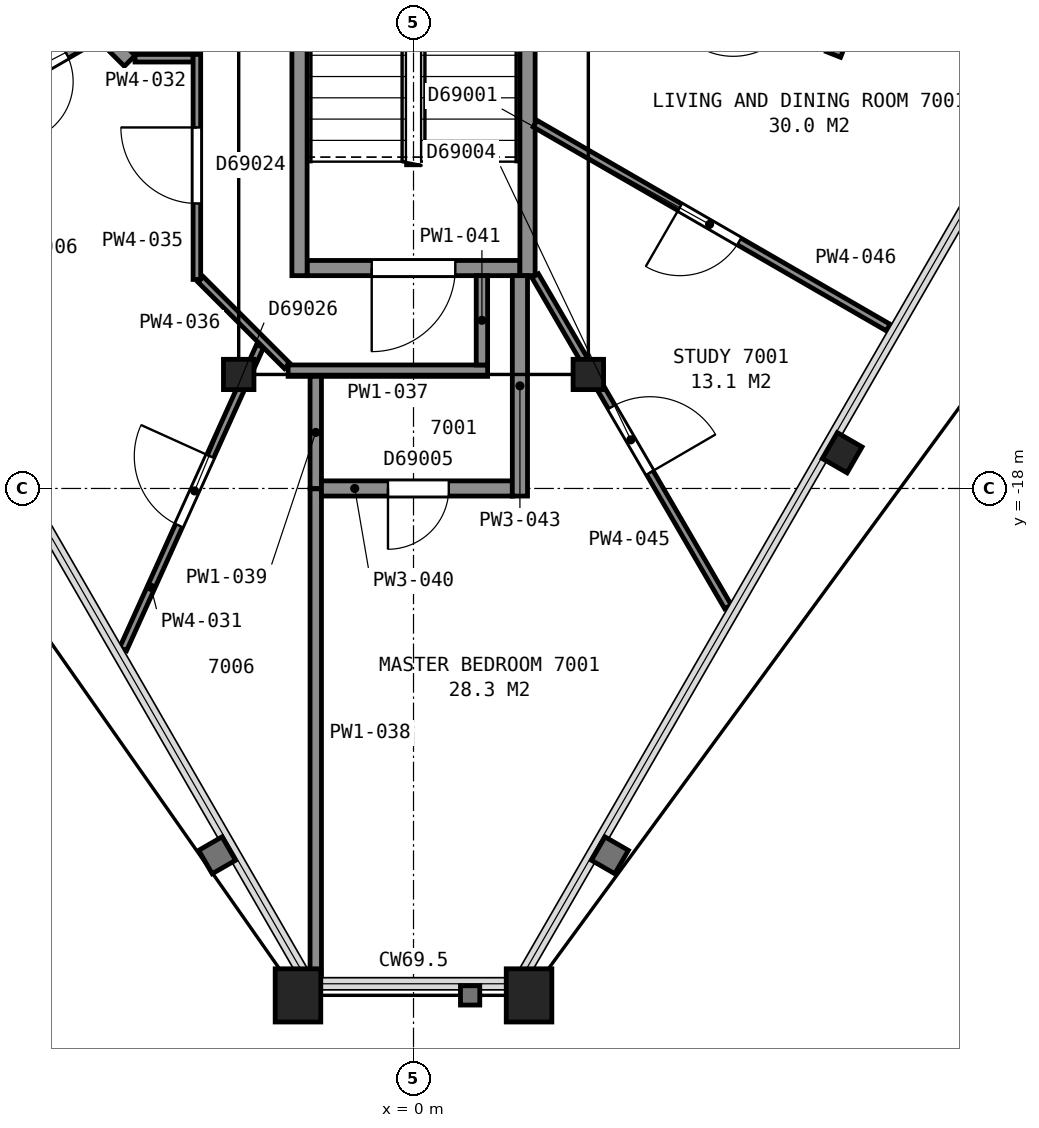
"""IFC4 building model, lengths in metres.
Left out: names, types, materials, properties, quantities, classifications, styles, units other than length and angle.
Written with IfcOpenShell. Run it as: python <this file> out.ifc"""

import sys

from ifc_helpers import new_model, si_unit, direction, frame, frame_2d, origin, origin_2d, place, context, subcontext, project, spatial, rectangle, hollow_rectangle, i_section, extrude, element, fill, save


model = new_model("IFC4")
c1 = context("Model", 3, precision=1e-05, world=origin(), true_north=direction((0.0, 1.0)))
c2 = subcontext(c1, "Body", "Model", "MODEL_VIEW")
j1 = project(units=[si_unit("LENGTHUNIT", "METRE"), si_unit("PLANEANGLEUNIT", "RADIAN")], contexts=[c1])
p1 = place(None, origin())
s1 = spatial("IfcSite", under=j1, at=p1, CompositionType="ELEMENT")
p2 = place(p1, origin())
s2 = spatial("IfcBuilding", under=s1, at=p2, CompositionType="ELEMENT")
p3 = place(p2, frame((0.0, 0.0, 278.8)))
s3 = spatial("IfcBuildingStorey", under=s2, at=p3, CompositionType="ELEMENT", Elevation=278.8)
for number, where, z_axis, x_axis in (
    (1, (-1.52, -24.67, 0.0), (0.0, 0.0, 1.0), (-1.0, 0.0, 0.0)),
    (2, (1.52, -24.67, 0.0), (0.0, 0.0, 1.0), (-1.0, 0.0, 0.0)),
):
    element("IfcColumn", number, at=place(p3, frame(where, z_axis=z_axis, x_axis=x_axis)), inside=s3, PredefinedType="COLUMN", context=c2, shape_type="SweptSolid", body=[
        extrude(hollow_rectangle(XDim=0.6, YDim=0.7, WallThickness=0.04, at=origin_2d()), origin(), (0.0, 0.0, 1.0), 3.7),
    ])
p4 = place(p3, frame((5.64, -17.53, 0.0), z_axis=(0.0, 0.0, 1.0), x_axis=(-0.5, -0.866025403784, 0.0)))
e3 = element("IfcColumn", 3, at=p4, inside=s3, PredefinedType="COLUMN", context=c2, shape_type="SweptSolid", body=[
    extrude(i_section(OverallWidth=0.394, OverallDepth=0.376, WebThickness=0.017, FlangeThickness=0.028, FilletRadius=0.015, at=origin_2d()), origin(), (0.0, 0.0, 1.0), 3.7),
])
for number, where, z_axis, x_axis in (
    (4, (-2.3, -16.5, 0.0), (0.0, 0.0, 1.0), (-1.0, 0.0, 0.0)),
    (5, (2.3, -16.5, 0.0), (0.0, 0.0, 1.0), (-1.0, 0.0, 0.0)),
):
    element("IfcColumn", number, at=place(p3, frame(where, z_axis=z_axis, x_axis=x_axis)), inside=s3, PredefinedType="COLUMN", context=c2, shape_type="SweptSolid", body=[
        extrude(i_section(OverallWidth=0.401, OverallDepth=0.399, WebThickness=0.025, FlangeThickness=0.04, FilletRadius=0.015, at=origin_2d()), origin(), (0.0, 0.0, 1.0), 3.7),
    ])
p5 = place(p3, frame((-1.4, -15.1, 0.0), z_axis=(0.0, 0.0, 1.0), x_axis=(1.0, 0.0, 0.0)))
e6 = element("IfcWall", 6, at=p5, inside=s3, PredefinedType="PARTITIONING", context=c2, shape_type="SweptSolid", body=[
    extrude(rectangle(XDim=2.8, YDim=0.2, at=frame_2d((1.4, 0.0))), origin(), (0.0, 0.0, 1.0), 3.45),
])
p6 = place(p5, frame((0.85, 0.0, 0.0)))
e7 = element("IfcOpeningElement", 7, at=p6, cuts=e6, PredefinedType="OPENING", context=c2, shape_type="SweptSolid", body=[
    extrude(rectangle(XDim=1.1, YDim=2.1, at=frame_2d((0.55, 1.05))), frame((0.0, 0.11, 0.0), z_axis=(0.0, -1.0, 0.0), x_axis=(1.0, 0.0, 0.0)), (0.0, 0.0, 1.0), 0.22),
])
for number, where, z_axis, x_axis in (
    (8, (1.5, -8.0, 0.0), (0.0, 0.0, 1.0), (0.0, -1.0, 0.0)),
    (9, (-1.5, -8.0, 0.0), (0.0, 0.0, 1.0), (0.0, -1.0, 0.0)),
):
    element("IfcWall", number, at=place(p3, frame(where, z_axis=z_axis, x_axis=x_axis)), inside=s3, PredefinedType="PARTITIONING", context=c2, shape_type="SweptSolid", body=[
        extrude(rectangle(XDim=7.2, YDim=0.2, at=frame_2d((3.6, 0.0))), origin(), (0.0, 0.0, 1.0), 3.45),
    ])
p7 = place(p3, frame((-5.607, -12.838, 0.0), z_axis=(0.0, 0.0, 1.0), x_axis=(0.866095534226, 0.499878510834, 0.0)))
e10 = element("IfcWall", 10, at=p7, inside=s3, PredefinedType="PARTITIONING", context=c2, shape_type="SweptSolid", body=[
    extrude(rectangle(XDim=1.58, YDim=0.2, at=frame_2d((0.79, 0.0))), origin(), (0.0, 0.0, 1.0), 2.723),
])
p8 = place(p7, frame((0.38, 0.0, 0.0)))
e11 = element("IfcOpeningElement", 11, at=p8, cuts=e10, PredefinedType="OPENING", context=c2, shape_type="SweptSolid", body=[
    extrude(rectangle(XDim=0.8, YDim=2.1, at=frame_2d((0.4, 1.05))), frame((0.0, 0.11, 0.0), z_axis=(0.0, -1.0, 0.0), x_axis=(1.0, 0.0, 0.0)), (0.0, 0.0, 1.0), 0.22),
])
p9 = place(p3, frame((-5.09, -11.018, 0.0), z_axis=(0.0, 0.0, 1.0), x_axis=(0.707106781187, -0.707106781187, 0.0)))
e12 = element("IfcWall", 12, at=p9, inside=s3, PredefinedType="PARTITIONING", context=c2, shape_type="SweptSolid", body=[
    extrude(rectangle(XDim=1.918, YDim=0.2, at=frame_2d((0.959, 0.0))), origin(), (0.0, 0.0, 1.0), 2.723),
])
p10 = place(p3, frame((-2.019, -16.127, 0.0), z_axis=(0.0, 0.0, 1.0), x_axis=(-0.411876718461, -0.911239578151, 0.0)))
e13 = element("IfcWall", 13, at=p10, inside=s3, PredefinedType="PARTITIONING", context=c2, shape_type="SweptSolid", body=[
    extrude(rectangle(XDim=4.376, YDim=0.1, at=frame_2d((2.188, 0.0))), origin(), (0.0, 0.0, 1.0), 2.723),
])
p11 = place(p10, frame((1.591, 0.0, 0.0)))
e14 = element("IfcOpeningElement", 14, at=p11, cuts=e13, PredefinedType="OPENING", context=c2, shape_type="SweptSolid", body=[
    extrude(rectangle(XDim=1.0, YDim=2.1, at=frame_2d((0.5, 1.05))), frame((0.0, 0.06, 0.0), z_axis=(0.0, -1.0, 0.0), x_axis=(1.0, 0.0, 0.0)), (0.0, 0.0, 1.0), 0.12),
])
p12 = place(p3, frame((-3.664, -12.339, 0.0), z_axis=(0.0, 0.0, 1.0), x_axis=(1.0, 0.0, 0.0)))
e15 = element("IfcWall", 15, at=p12, inside=s3, PredefinedType="PARTITIONING", context=c2, shape_type="SweptSolid", body=[
    extrude(rectangle(XDim=0.764, YDim=0.1, at=frame_2d((0.382, 0.0))), origin(), (0.0, 0.0, 1.0), 2.723),
])
p13 = place(p3, frame((-2.85, -15.25, 0.0), z_axis=(0.0, 0.0, 1.0), x_axis=(0.0, 1.0, 0.0)))
e16 = element("IfcWall", 16, at=p13, inside=s3, PredefinedType="PARTITIONING", context=c2, shape_type="SweptSolid", body=[
    extrude(rectangle(XDim=2.961, YDim=0.1, at=frame_2d((1.48, 0.0))), origin(), (0.0, 0.0, 1.0), 2.723),
])
p14 = place(p13, frame((1.0, 0.0, 0.0)))
e17 = element("IfcOpeningElement", 17, at=p14, cuts=e16, PredefinedType="OPENING", context=c2, shape_type="SweptSolid", body=[
    extrude(rectangle(XDim=1.0, YDim=2.1, at=frame_2d((0.5, 1.05))), frame((0.0, 0.06, 0.0), z_axis=(0.0, -1.0, 0.0), x_axis=(1.0, 0.0, 0.0)), (0.0, 0.0, 1.0), 0.12),
])
p15 = place(p3, frame((-2.801, -15.25, 0.0), z_axis=(0.0, 0.0, 1.0), x_axis=(0.707106781187, -0.707106781187, 0.0)))
e18 = element("IfcWall", 18, at=p15, inside=s3, PredefinedType="PARTITIONING", context=c2, shape_type="SweptSolid", body=[
    extrude(rectangle(XDim=1.608, YDim=0.1, at=frame_2d((0.804, 0.0))), origin(), (0.0, 0.0, 1.0), 2.723),
])
p16 = place(p3, frame((-1.65, -16.45, 0.0), z_axis=(0.0, 0.0, 1.0), x_axis=(1.0, 0.0, 0.0)))
e19 = element("IfcWall", 19, at=p16, inside=s3, PredefinedType="PARTITIONING", context=c2, shape_type="SweptSolid", body=[
    extrude(rectangle(XDim=2.625, YDim=0.15, at=frame_2d((1.312, 0.0))), origin(), (0.0, 0.0, 1.0), 2.723),
])
p17 = place(p3, frame((-1.286, -24.421, 0.0), z_axis=(0.0, 0.0, 1.0), x_axis=(0.0, 1.0, 0.0)))
e20 = element("IfcWall", 20, at=p17, inside=s3, PredefinedType="PARTITIONING", context=c2, shape_type="SweptSolid", body=[
    extrude(rectangle(XDim=6.416, YDim=0.15, at=frame_2d((3.208, 0.0))), origin(), (0.0, 0.0, 1.0), 2.723),
])
p18 = place(p3, frame((-1.286, -18.0, 0.0), z_axis=(0.0, 0.0, 1.0), x_axis=(0.0, 1.0, 0.0)))
e21 = element("IfcWall", 21, at=p18, inside=s3, PredefinedType="PARTITIONING", context=c2, shape_type="SweptSolid", body=[
    extrude(rectangle(XDim=1.475, YDim=0.15, at=frame_2d((0.738, 0.0))), origin(), (0.0, 0.0, 1.0), 2.723),
])
p19 = place(p3, frame((-1.211, -18.0, 0.0), z_axis=(0.0, 0.0, 1.0), x_axis=(1.0, 0.0, 0.0)))
e22 = element("IfcWall", 22, at=p19, inside=s3, PredefinedType="PARTITIONING", context=c2, shape_type="SweptSolid", body=[
    extrude(rectangle(XDim=2.511, YDim=0.2, at=frame_2d((1.255, 0.0))), origin(), (0.0, 0.0, 1.0), 2.723),
])
p20 = place(p19, frame((0.875, 0.0, 0.0)))
e23 = element("IfcOpeningElement", 23, at=p20, cuts=e22, PredefinedType="OPENING", context=c2, shape_type="SweptSolid", body=[
    extrude(rectangle(XDim=0.8, YDim=2.1, at=frame_2d((0.4, 1.05))), frame((0.0, 0.11, 0.0), z_axis=(0.0, -1.0, 0.0), x_axis=(1.0, 0.0, 0.0)), (0.0, 0.0, 1.0), 0.22),
])
p21 = place(p3, frame((0.9, -16.375, 0.0), z_axis=(0.0, 0.0, 1.0), x_axis=(0.0, 1.0, 0.0)))
e24 = element("IfcWall", 24, at=p21, inside=s3, PredefinedType="PARTITIONING", context=c2, shape_type="SweptSolid", body=[
    extrude(rectangle(XDim=1.175, YDim=0.15, at=frame_2d((0.587, 0.0))), origin(), (0.0, 0.0, 1.0), 2.723),
])
p22 = place(p3, frame((1.4, -18.1, 0.0), z_axis=(0.0, 0.0, 1.0), x_axis=(0.0, 1.0, 0.0)))
e25 = element("IfcWall", 25, at=p22, inside=s3, PredefinedType="PARTITIONING", context=c2, shape_type="SweptSolid", body=[
    extrude(rectangle(XDim=2.9, YDim=0.2, at=frame_2d((1.45, 0.0))), origin(), (0.0, 0.0, 1.0), 2.723),
])
p23 = place(p3, frame((4.137, -19.557, 0.0), z_axis=(0.0, 0.0, 1.0), x_axis=(-0.503229634544, 0.864152726615, 0.0)))
e26 = element("IfcWall", 26, at=p23, inside=s3, PredefinedType="PARTITIONING", context=c2, shape_type="SweptSolid", body=[
    extrude(rectangle(XDim=5.042, YDim=0.1, at=frame_2d((2.521, 0.0))), origin(), (0.0, 0.0, 1.0), 2.723),
])
p24 = place(p23, frame((2.042, 0.0, 0.0)))
e27 = element("IfcOpeningElement", 27, at=p24, cuts=e26, PredefinedType="OPENING", context=c2, shape_type="SweptSolid", body=[
    extrude(rectangle(XDim=1.0, YDim=2.1, at=frame_2d((0.5, 1.05))), frame((0.0, 0.06, 0.0), z_axis=(0.0, -1.0, 0.0), x_axis=(1.0, 0.0, 0.0)), (0.0, 0.0, 1.0), 0.12),
])
p25 = place(p3, frame((6.247, -15.883, 0.0), z_axis=(0.0, 0.0, 1.0), x_axis=(-0.866008267802, 0.500029679218, 0.0)))
e28 = element("IfcWall", 28, at=p25, inside=s3, PredefinedType="PARTITIONING", context=c2, shape_type="SweptSolid", body=[
    extrude(rectangle(XDim=5.365, YDim=0.1, at=frame_2d((2.683, 0.0))), origin(), (0.0, 0.0, 1.0), 2.723),
])
p26 = place(p25, frame((2.265, 0.0, 0.0)))
e29 = element("IfcOpeningElement", 29, at=p26, cuts=e28, PredefinedType="OPENING", context=c2, shape_type="SweptSolid", body=[
    extrude(rectangle(XDim=0.9, YDim=2.1, at=frame_2d((0.45, 1.05))), frame((0.0, 0.06, 0.0), z_axis=(0.0, -1.0, 0.0), x_axis=(1.0, 0.0, 0.0)), (0.0, 0.0, 1.0), 0.12),
])
p27 = place(p3, frame((5.526, -12.29, 0.0), z_axis=(0.0, 0.0, 1.0), x_axis=(0.364786545928, 0.931091174864, 0.0)))
e30 = element("IfcWall", 30, at=p27, inside=s3, PredefinedType="PARTITIONING", context=c2, shape_type="SweptSolid", body=[
    extrude(rectangle(XDim=3.019, YDim=0.2, at=frame_2d((1.51, 0.0))), origin(), (0.0, 0.0, 1.0), 2.723),
])
p28 = place(p6, origin())
e31 = element("IfcDoor", 31, at=p28, inside=s3, OperationType="SINGLE_SWING_LEFT", PredefinedType="DOOR", context=c2, shape_type="SweptSolid", body=[
    extrude(rectangle(XDim=1.1, YDim=2.1, at=frame_2d((0.55, 1.05))), frame((0.0, 0.025, 0.0), z_axis=(0.0, -1.0, 0.0), x_axis=(1.0, 0.0, 0.0)), (0.0, 0.0, 1.0), 0.05),
])
fill(e7, e31)
p29 = place(p8, origin())
e32 = element("IfcDoor", 32, at=p29, inside=s3, OperationType="SINGLE_SWING_LEFT", PredefinedType="DOOR", context=c2, shape_type="SweptSolid", body=[
    extrude(rectangle(XDim=0.8, YDim=2.1, at=frame_2d((0.4, 1.05))), frame((0.0, 0.025, 0.0), z_axis=(0.0, -1.0, 0.0), x_axis=(1.0, 0.0, 0.0)), (0.0, 0.0, 1.0), 0.05),
])
fill(e11, e32)
p30 = place(p11, origin())
e33 = element("IfcDoor", 33, at=p30, inside=s3, OperationType="SINGLE_SWING_LEFT", PredefinedType="DOOR", context=c2, shape_type="SweptSolid", body=[
    extrude(rectangle(XDim=1.0, YDim=2.1, at=frame_2d((0.5, 1.05))), frame((0.0, 0.025, 0.0), z_axis=(0.0, -1.0, 0.0), x_axis=(1.0, 0.0, 0.0)), (0.0, 0.0, 1.0), 0.05),
])
fill(e14, e33)
p31 = place(p14, origin())
e34 = element("IfcDoor", 34, at=p31, inside=s3, OperationType="SINGLE_SWING_RIGHT", PredefinedType="DOOR", context=c2, shape_type="SweptSolid", body=[
    extrude(rectangle(XDim=1.0, YDim=2.1, at=frame_2d((0.5, 1.05))), frame((0.0, 0.025, 0.0), z_axis=(0.0, -1.0, 0.0), x_axis=(1.0, 0.0, 0.0)), (0.0, 0.0, 1.0), 0.05),
])
fill(e17, e34)
p32 = place(p20, origin())
e35 = element("IfcDoor", 35, at=p32, inside=s3, OperationType="SINGLE_SWING_LEFT", PredefinedType="DOOR", context=c2, shape_type="SweptSolid", body=[
    extrude(rectangle(XDim=0.8, YDim=2.1, at=frame_2d((0.4, 1.05))), frame((0.0, 0.025, 0.0), z_axis=(0.0, -1.0, 0.0), x_axis=(1.0, 0.0, 0.0)), (0.0, 0.0, 1.0), 0.05),
])
fill(e23, e35)
p33 = place(p24, origin())
e36 = element("IfcDoor", 36, at=p33, inside=s3, OperationType="SINGLE_SWING_LEFT", PredefinedType="DOOR", context=c2, shape_type="SweptSolid", body=[
    extrude(rectangle(XDim=1.0, YDim=2.1, at=frame_2d((0.5, 1.05))), frame((0.0, 0.025, 0.0), z_axis=(0.0, -1.0, 0.0), x_axis=(1.0, 0.0, 0.0)), (0.0, 0.0, 1.0), 0.05),
])
fill(e27, e36)
p34 = place(p26, origin())
e37 = element("IfcDoor", 37, at=p34, inside=s3, OperationType="SINGLE_SWING_RIGHT", PredefinedType="DOOR", context=c2, shape_type="SweptSolid", body=[
    extrude(rectangle(XDim=0.9, YDim=2.1, at=frame_2d((0.45, 1.05))), frame((0.0, 0.025, 0.0), z_axis=(0.0, -1.0, 0.0), x_axis=(1.0, 0.0, 0.0)), (0.0, 0.0, 1.0), 0.05),
])
fill(e29, e37)
save(model, sys.argv[1])
